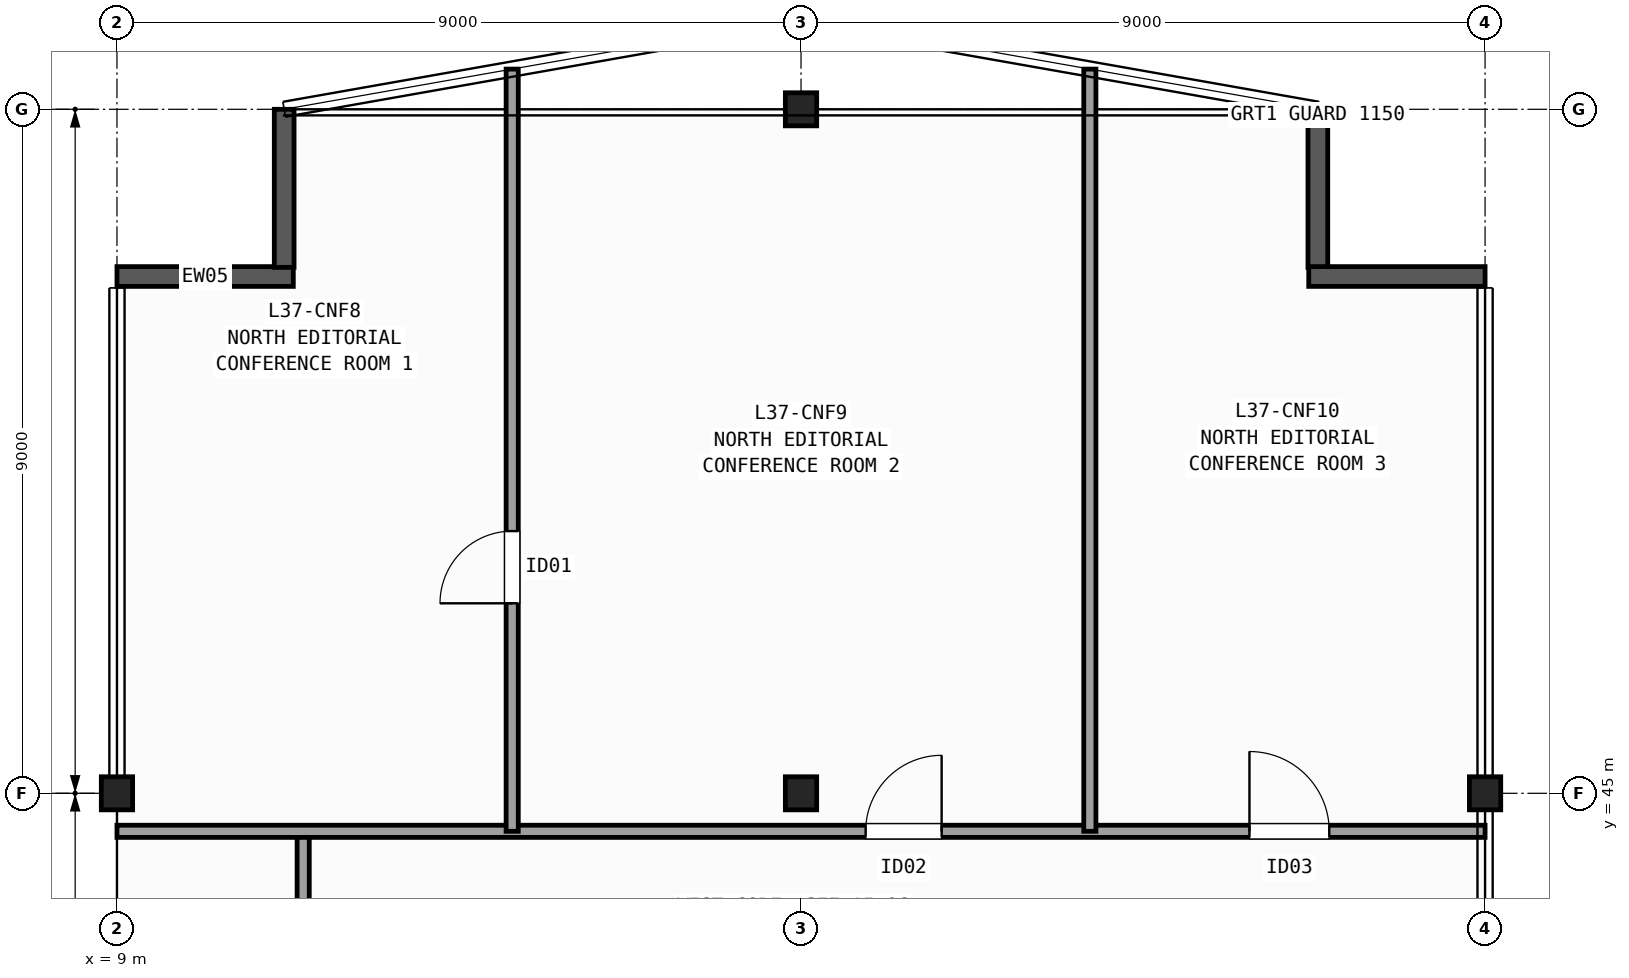
"""IFC4 building model, lengths in metres.
Left out: names, types, materials, properties, quantities, classifications, styles, units other than length and angle.
Written with IfcOpenShell. Run it as: python <this file> out.ifc"""

import sys

from ifc_helpers import new_model, si_unit, direction, frame, frame_2d, origin, origin_2d, place, context, subcontext, project, spatial, rectangle, i_section, extrude, element, fill, save


model = new_model("IFC4")
c1 = context("Model", 3, precision=1e-05, world=origin(), true_north=direction((0.0, 1.0)))
c2 = subcontext(c1, "Body", "Model", "MODEL_VIEW")
j1 = project(units=[si_unit("LENGTHUNIT", "METRE"), si_unit("PLANEANGLEUNIT", "RADIAN")], contexts=[c1])
p1 = place(None, origin())
s1 = spatial("IfcSite", under=j1, at=p1, CompositionType="ELEMENT")
p2 = place(p1, origin())
s2 = spatial("IfcBuilding", under=s1, at=p2, CompositionType="ELEMENT")
p3 = place(p2, frame((0.0, 0.0, 150.7)))
s3 = spatial("IfcBuildingStorey", under=s2, at=p3, CompositionType="ELEMENT", Elevation=150.7)
for number, where, z_axis, x_axis in (
    (1, (9.0, 45.0, 0.0), (0.0, 0.0, 1.0), (1.0, 0.0, 0.0)),
    (2, (18.0, 45.0, 0.0), (0.0, 0.0, 1.0), (1.0, 0.0, 0.0)),
    (3, (18.0, 54.0, 0.0), (0.0, 0.0, 1.0), (1.0, 0.0, 0.0)),
    (4, (27.0, 45.0, 0.0), (0.0, 0.0, 1.0), (1.0, 0.0, 0.0)),
):
    element("IfcColumn", number, at=place(p3, frame(where, z_axis=z_axis, x_axis=x_axis)), inside=s3, PredefinedType="COLUMN", context=c2, shape_type="SweptSolid", body=[
        extrude(i_section(OverallWidth=0.412, OverallDepth=0.435, WebThickness=0.036, FlangeThickness=0.057, FilletRadius=0.015, at=origin_2d()), origin(), (0.0, 0.0, 1.0), 3.7),
    ])
p4 = place(p3, frame((9.0, 51.8, 0.0), z_axis=(0.0, 0.0, 1.0), x_axis=(1.0, 0.0, 0.0)))
e5 = element("IfcWall", 5, at=p4, inside=s3, PredefinedType="SOLIDWALL", context=c2, shape_type="SweptSolid", body=[
    extrude(rectangle(XDim=2.32, YDim=0.26, at=frame_2d((1.16, 0.0))), origin(), (0.0, 0.0, 1.0), 3.42),
])
for number, where, z_axis, x_axis in (
    (6, (11.2, 51.92, 0.0), (0.0, 0.0, 1.0), (0.0, 1.0, 0.0)),
    (7, (24.8, 54.0, 0.0), (0.0, 0.0, 1.0), (0.0, -1.0, 0.0)),
):
    element("IfcWall", number, at=place(p3, frame(where, z_axis=z_axis, x_axis=x_axis)), inside=s3, PredefinedType="SOLIDWALL", context=c2, shape_type="SweptSolid", body=[
        extrude(rectangle(XDim=2.08, YDim=0.26, at=frame_2d((1.04, 0.0))), origin(), (0.0, 0.0, 1.0), 3.42),
    ])
p5 = place(p3, frame((24.68, 51.8, 0.0), z_axis=(0.0, 0.0, 1.0), x_axis=(1.0, 0.0, 0.0)))
e8 = element("IfcWall", 8, at=p5, inside=s3, PredefinedType="SOLIDWALL", context=c2, shape_type="SweptSolid", body=[
    extrude(rectangle(XDim=2.32, YDim=0.26, at=frame_2d((1.16, 0.0))), origin(), (0.0, 0.0, 1.0), 3.42),
])
p6 = place(p3, frame((11.45, 42.4, 0.0), z_axis=(0.0, 0.0, 1.0), x_axis=(0.0, 1.0, 0.0)))
e9 = element("IfcWall", 9, at=p6, inside=s3, PredefinedType="PARTITIONING", context=c2, shape_type="SweptSolid", body=[
    extrude(rectangle(XDim=2.1, YDim=0.16, at=frame_2d((1.05, 0.0))), origin(), (0.0, 0.0, 1.0), 3.42),
])
p7 = place(p3, frame((9.0, 44.5, 0.0), z_axis=(0.0, 0.0, 1.0), x_axis=(1.0, 0.0, 0.0)))
e10 = element("IfcWall", 10, at=p7, inside=s3, PredefinedType="PARTITIONING", context=c2, shape_type="SweptSolid", body=[
    extrude(rectangle(XDim=18.0, YDim=0.16, at=frame_2d((9.0, 0.0))), origin(), (0.0, 0.0, 1.0), 2.634),
])
p8 = place(p7, frame((9.85, 0.0, 0.0)))
e11 = element("IfcOpeningElement", 11, at=p8, cuts=e10, PredefinedType="OPENING", context=c2, shape_type="SweptSolid", body=[
    extrude(rectangle(XDim=1.0, YDim=2.1, at=frame_2d((0.5, 1.05))), frame((0.0, 0.09, 0.0), z_axis=(0.0, -1.0, 0.0), x_axis=(1.0, 0.0, 0.0)), (0.0, 0.0, 1.0), 0.18),
])
p9 = place(p7, frame((14.9, 0.0, 0.0)))
e12 = element("IfcOpeningElement", 12, at=p9, cuts=e10, PredefinedType="OPENING", context=c2, shape_type="SweptSolid", body=[
    extrude(rectangle(XDim=1.05, YDim=2.15, at=frame_2d((0.525, 1.075))), frame((0.0, 0.09, 0.0), z_axis=(0.0, -1.0, 0.0), x_axis=(1.0, 0.0, 0.0)), (0.0, 0.0, 1.0), 0.18),
])
p10 = place(p3, frame((14.2, 44.5, 0.0), z_axis=(0.0, 0.0, 1.0), x_axis=(0.0, 1.0, 0.0)))
e13 = element("IfcWall", 13, at=p10, inside=s3, PredefinedType="PARTITIONING", context=c2, shape_type="SweptSolid", body=[
    extrude(rectangle(XDim=10.029, YDim=0.16, at=frame_2d((5.015, 0.0))), origin(), (0.0, 0.0, 1.0), 3.42),
])
p11 = place(p10, frame((3.0, 0.0, 0.0)))
e14 = element("IfcOpeningElement", 14, at=p11, cuts=e13, PredefinedType="OPENING", context=c2, shape_type="SweptSolid", body=[
    extrude(rectangle(XDim=0.95, YDim=2.1, at=frame_2d((0.475, 1.05))), frame((0.0, 0.09, 0.0), z_axis=(0.0, -1.0, 0.0), x_axis=(1.0, 0.0, 0.0)), (0.0, 0.0, 1.0), 0.18),
])
p12 = place(p3, frame((21.8, 44.5, 0.0), z_axis=(0.0, 0.0, 1.0), x_axis=(0.0, 1.0, 0.0)))
e15 = element("IfcWall", 15, at=p12, inside=s3, PredefinedType="PARTITIONING", context=c2, shape_type="SweptSolid", body=[
    extrude(rectangle(XDim=10.029, YDim=0.16, at=frame_2d((5.015, 0.0))), origin(), (0.0, 0.0, 1.0), 3.42),
])
p13 = place(p11, origin())
e16 = element("IfcDoor", 16, at=p13, inside=s3, OperationType="SINGLE_SWING_LEFT", PredefinedType="DOOR", context=c2, shape_type="SweptSolid", body=[
    extrude(rectangle(XDim=0.95, YDim=2.1, at=frame_2d((0.475, 1.05))), frame((0.0, 0.025, 0.0), z_axis=(0.0, -1.0, 0.0), x_axis=(1.0, 0.0, 0.0)), (0.0, 0.0, 1.0), 0.05),
])
fill(e14, e16)
p14 = place(p8, origin())
e17 = element("IfcDoor", 17, at=p14, inside=s3, OperationType="SINGLE_SWING_RIGHT", PredefinedType="DOOR", context=c2, shape_type="SweptSolid", body=[
    extrude(rectangle(XDim=1.0, YDim=2.1, at=frame_2d((0.5, 1.05))), frame((0.0, 0.025, 0.0), z_axis=(0.0, -1.0, 0.0), x_axis=(1.0, 0.0, 0.0)), (0.0, 0.0, 1.0), 0.05),
])
fill(e11, e17)
p15 = place(p9, origin())
e18 = element("IfcDoor", 18, at=p15, inside=s3, OperationType="SINGLE_SWING_LEFT", PredefinedType="DOOR", context=c2, shape_type="SweptSolid", body=[
    extrude(rectangle(XDim=1.05, YDim=2.15, at=frame_2d((0.525, 1.075))), frame((0.0, 0.025, 0.0), z_axis=(0.0, -1.0, 0.0), x_axis=(1.0, 0.0, 0.0)), (0.0, 0.0, 1.0), 0.05),
])
fill(e12, e18)
save(model, sys.argv[1])
